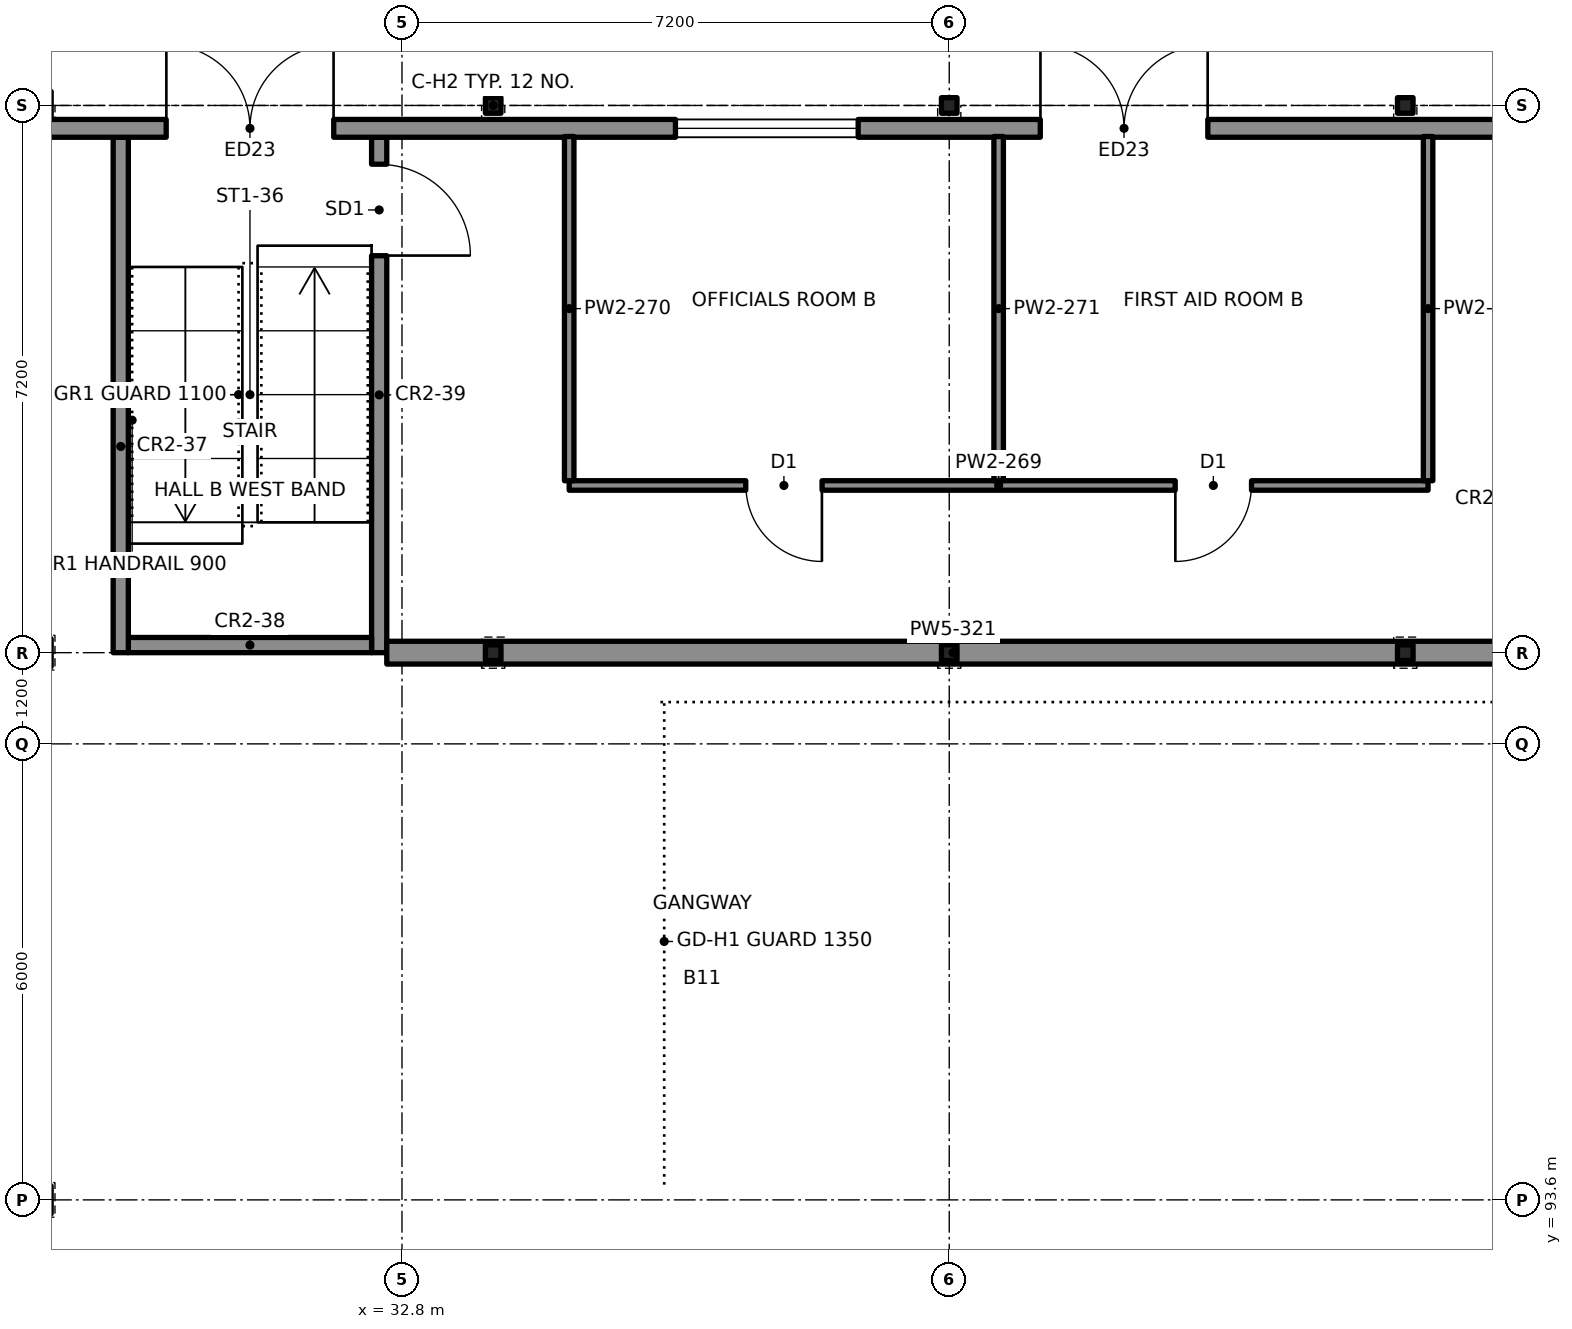
"""IFC4 building model, lengths in metres.
Left out: names, types, materials, properties, quantities, classifications, styles, units other than length and angle.
Written with IfcOpenShell. Run it as: python <this file> out.ifc"""

import sys

from ifc_helpers import new_model, si_unit, direction, frame, frame_2d, origin, origin_2d, place, context, subcontext, project, spatial, rectangle, i_section, extrude, element, fill, save


model = new_model("IFC4")
c1 = context("Model", 3, precision=1e-05, world=origin(), true_north=direction((0.0, 1.0)))
c2 = subcontext(c1, "Body", "Model", "MODEL_VIEW")
j1 = project(units=[si_unit("LENGTHUNIT", "METRE"), si_unit("PLANEANGLEUNIT", "RADIAN")], contexts=[c1])
p1 = place(None, origin())
s1 = spatial("IfcSite", under=j1, at=p1, CompositionType="ELEMENT")
p2 = place(p1, origin())
s2 = spatial("IfcBuilding", under=s1, at=p2, CompositionType="ELEMENT")
p3 = place(p2, origin())
s3 = spatial("IfcBuildingStorey", under=s2, at=p3, CompositionType="ELEMENT", Elevation=0.0)
for number, where, z_axis, x_axis in (
    (1, (34.0, 100.8, -0.5), (0.0, 0.0, 1.0), (1.0, 0.0, 0.0)),
    (2, (34.0, 108.0, -0.5), (0.0, 0.0, 1.0), (1.0, 0.0, 0.0)),
    (3, (40.0, 100.8, -0.5), (0.0, 0.0, 1.0), (1.0, 0.0, 0.0)),
    (4, (40.0, 108.0, -0.5), (0.0, 0.0, 1.0), (1.0, 0.0, 0.0)),
    (5, (46.0, 100.8, -0.5), (0.0, 0.0, 1.0), (1.0, 0.0, 0.0)),
    (6, (46.0, 108.0, -0.5), (0.0, 0.0, 1.0), (1.0, 0.0, 0.0)),
):
    element("IfcColumn", number, at=place(p3, frame(where, z_axis=z_axis, x_axis=x_axis)), inside=s3, PredefinedType="COLUMN", context=c2, shape_type="SweptSolid", body=[
        extrude(i_section(OverallWidth=0.205, OverallDepth=0.31, WebThickness=0.01, FlangeThickness=0.016, at=origin_2d()), origin(), (0.0, 0.0, 1.0), 4.9),
    ])
p4 = place(p3, frame((26.8, 107.699, 0.0), z_axis=(0.0, 0.0, 1.0), x_axis=(1.0, 0.0, 0.0)))
e7 = element("IfcWall", 7, at=p4, inside=s3, PredefinedType="SOLIDWALL", context=c2, shape_type="SweptSolid", body=[
    extrude(rectangle(XDim=50.4, YDim=0.234, at=frame_2d((25.2, 0.0))), origin(), (0.0, 0.0, 1.0), 4.4),
])
p5 = place(p4, frame((9.6, 0.0, 1.0)))
e8 = element("IfcOpeningElement", 8, at=p5, cuts=e7, PredefinedType="OPENING", context=c2, shape_type="SweptSolid", body=[
    extrude(rectangle(XDim=2.4, YDim=2.4, at=frame_2d((1.2, 1.2))), frame((0.0, 0.127, 0.0), z_axis=(0.0, -1.0, 0.0), x_axis=(1.0, 0.0, 0.0)), (0.0, 0.0, 1.0), 0.254),
])
p6 = place(p4, frame((21.6, 0.0, 1.0)))
e9 = element("IfcOpeningElement", 9, at=p6, cuts=e7, PredefinedType="OPENING", context=c2, shape_type="SweptSolid", body=[
    extrude(rectangle(XDim=2.4, YDim=2.4, at=frame_2d((1.2, 1.2))), frame((0.0, 0.127, 0.0), z_axis=(0.0, -1.0, 0.0), x_axis=(1.0, 0.0, 0.0)), (0.0, 0.0, 1.0), 0.254),
])
p7 = place(p4, frame((26.4, 0.0, 1.0)))
e10 = element("IfcOpeningElement", 10, at=p7, cuts=e7, PredefinedType="OPENING", context=c2, shape_type="SweptSolid", body=[
    extrude(rectangle(XDim=2.4, YDim=2.4, at=frame_2d((1.2, 1.2))), frame((0.0, 0.127, 0.0), z_axis=(0.0, -1.0, 0.0), x_axis=(1.0, 0.0, 0.0)), (0.0, 0.0, 1.0), 0.254),
])
p8 = place(p4, frame((38.4, 0.0, 1.0)))
e11 = element("IfcOpeningElement", 11, at=p8, cuts=e7, PredefinedType="OPENING", context=c2, shape_type="SweptSolid", body=[
    extrude(rectangle(XDim=2.4, YDim=2.4, at=frame_2d((1.2, 1.2))), frame((0.0, 0.127, 0.0), z_axis=(0.0, -1.0, 0.0), x_axis=(1.0, 0.0, 0.0)), (0.0, 0.0, 1.0), 0.254),
])
p9 = place(p4, frame((14.4, 0.0, 0.0)))
e12 = element("IfcOpeningElement", 12, at=p9, cuts=e7, PredefinedType="OPENING", context=c2, shape_type="SweptSolid", body=[
    extrude(rectangle(XDim=2.2, YDim=2.4, at=frame_2d((1.1, 1.2))), frame((0.0, 0.127, 0.0), z_axis=(0.0, -1.0, 0.0), x_axis=(1.0, 0.0, 0.0)), (0.0, 0.0, 1.0), 0.254),
])
p10 = place(p4, frame((33.8, 0.0, 0.0)))
e13 = element("IfcOpeningElement", 13, at=p10, cuts=e7, PredefinedType="OPENING", context=c2, shape_type="SweptSolid", body=[
    extrude(rectangle(XDim=2.2, YDim=2.4, at=frame_2d((1.1, 1.2))), frame((0.0, 0.127, 0.0), z_axis=(0.0, -1.0, 0.0), x_axis=(1.0, 0.0, 0.0)), (0.0, 0.0, 1.0), 0.254),
])
p11 = place(p4, frame((2.9, 0.0, 0.0)))
e14 = element("IfcOpeningElement", 14, at=p11, cuts=e7, PredefinedType="OPENING", context=c2, shape_type="SweptSolid", body=[
    extrude(rectangle(XDim=2.2, YDim=2.4, at=frame_2d((1.1, 1.2))), frame((0.0, 0.127, 0.0), z_axis=(0.0, -1.0, 0.0), x_axis=(1.0, 0.0, 0.0)), (0.0, 0.0, 1.0), 0.254),
])
p12 = place(p4, frame((44.9, 0.0, 0.0)))
e15 = element("IfcOpeningElement", 15, at=p12, cuts=e7, PredefinedType="OPENING", context=c2, shape_type="SweptSolid", body=[
    extrude(rectangle(XDim=2.2, YDim=2.4, at=frame_2d((1.1, 1.2))), frame((0.0, 0.127, 0.0), z_axis=(0.0, -1.0, 0.0), x_axis=(1.0, 0.0, 0.0)), (0.0, 0.0, 1.0), 0.254),
])
p13 = place(p3, frame((29.1, 100.8, 0.0), z_axis=(0.0, 0.0, 1.0), x_axis=(0.0, 1.0, 0.0)))
e16 = element("IfcWall", 16, at=p13, inside=s3, PredefinedType="SOLIDWALL", context=c2, shape_type="SweptSolid", body=[
    extrude(rectangle(XDim=6.783, YDim=0.2, at=frame_2d((3.392, 0.0))), origin(), (0.0, 0.0, 1.0), 4.4),
])
p14 = place(p3, frame((32.5, 100.8, 0.0), z_axis=(0.0, 0.0, 1.0), x_axis=(0.0, 1.0, 0.0)))
e17 = element("IfcWall", 17, at=p14, inside=s3, PredefinedType="SOLIDWALL", context=c2, shape_type="SweptSolid", body=[
    extrude(rectangle(XDim=6.783, YDim=0.2, at=frame_2d((3.392, 0.0))), origin(), (0.0, 0.0, 1.0), 4.4),
])
p15 = place(p14, frame((5.225, 0.0, 0.0)))
e18 = element("IfcOpeningElement", 18, at=p15, cuts=e17, PredefinedType="OPENING", context=c2, shape_type="SweptSolid", body=[
    extrude(rectangle(XDim=1.2, YDim=2.1, at=frame_2d((0.6, 1.05))), frame((0.0, 0.11, 0.0), z_axis=(0.0, -1.0, 0.0), x_axis=(1.0, 0.0, 0.0)), (0.0, 0.0, 1.0), 0.22),
])
p16 = place(p3, frame((29.2, 100.9, 0.0), z_axis=(0.0, 0.0, 1.0), x_axis=(1.0, 0.0, 0.0)))
e19 = element("IfcWall", 19, at=p16, inside=s3, PredefinedType="SOLIDWALL", context=c2, shape_type="SweptSolid", body=[
    extrude(rectangle(XDim=3.2, YDim=0.2, at=frame_2d((1.6, 0.0))), origin(), (0.0, 0.0, 1.0), 4.4),
])
p17 = place(p3, frame((32.6, 100.8, 0.0), z_axis=(0.0, 0.0, 1.0), x_axis=(1.0, 0.0, 0.0)))
e20 = element("IfcWall", 20, at=p17, inside=s3, PredefinedType="PARTITIONING", context=c2, shape_type="SweptSolid", body=[
    extrude(rectangle(XDim=14.9, YDim=0.3, at=frame_2d((7.45, 0.0))), origin(), (0.0, 0.0, 1.0), 3.8),
])
p18 = place(p3, frame((35.0, 103.0, 0.0), z_axis=(0.0, 0.0, 1.0), x_axis=(1.0, 0.0, 0.0)))
e21 = element("IfcWall", 21, at=p18, inside=s3, PredefinedType="PARTITIONING", context=c2, shape_type="SweptSolid", body=[
    extrude(rectangle(XDim=11.3, YDim=0.125, at=frame_2d((5.65, 0.0))), origin(), (0.0, 0.0, 1.0), 3.65),
])
p19 = place(p18, frame((2.325, 0.0, 0.0)))
e22 = element("IfcOpeningElement", 22, at=p19, cuts=e21, PredefinedType="OPENING", context=c2, shape_type="SweptSolid", body=[
    extrude(rectangle(XDim=1.0, YDim=2.1, at=frame_2d((0.5, 1.05))), frame((0.0, 0.073, 0.0), z_axis=(0.0, -1.0, 0.0), x_axis=(1.0, 0.0, 0.0)), (0.0, 0.0, 1.0), 0.145),
])
p20 = place(p18, frame((7.975, 0.0, 0.0)))
e23 = element("IfcOpeningElement", 23, at=p20, cuts=e21, PredefinedType="OPENING", context=c2, shape_type="SweptSolid", body=[
    extrude(rectangle(XDim=1.0, YDim=2.1, at=frame_2d((0.5, 1.05))), frame((0.0, 0.073, 0.0), z_axis=(0.0, -1.0, 0.0), x_axis=(1.0, 0.0, 0.0)), (0.0, 0.0, 1.0), 0.145),
])
for number, where, z_axis, x_axis in (
    (24, (35.0, 103.062, 0.0), (0.0, 0.0, 1.0), (0.0, 1.0, 0.0)),
    (25, (40.65, 103.062, 0.0), (0.0, 0.0, 1.0), (0.0, 1.0, 0.0)),
    (26, (46.3, 103.062, 0.0), (0.0, 0.0, 1.0), (0.0, 1.0, 0.0)),
):
    element("IfcWall", number, at=place(p3, frame(where, z_axis=z_axis, x_axis=x_axis)), inside=s3, PredefinedType="PARTITIONING", context=c2, shape_type="SweptSolid", body=[
        extrude(rectangle(XDim=4.529, YDim=0.125, at=frame_2d((2.265, 0.0))), origin(), (0.0, 0.0, 1.0), 3.65),
    ])
p21 = place(p5, origin())
e27 = element("IfcWindow", 27, at=p21, inside=s3, PartitioningType="SINGLE_PANEL", PredefinedType="WINDOW", context=c2, shape_type="SweptSolid", body=[
    extrude(rectangle(XDim=2.4, YDim=2.4, at=frame_2d((1.2, 1.2))), frame((0.0, 0.03, 0.0), z_axis=(0.0, -1.0, 0.0), x_axis=(1.0, 0.0, 0.0)), (0.0, 0.0, 1.0), 0.06),
])
fill(e8, e27)
p22 = place(p9, origin())
e28 = element("IfcDoor", 28, at=p22, inside=s3, OperationType="DOUBLE_DOOR_SINGLE_SWING", PredefinedType="DOOR", context=c2, shape_type="SweptSolid", body=[
    extrude(rectangle(XDim=2.2, YDim=2.4, at=frame_2d((1.1, 1.2))), frame((0.0, 0.025, 0.0), z_axis=(0.0, -1.0, 0.0), x_axis=(1.0, 0.0, 0.0)), (0.0, 0.0, 1.0), 0.05),
])
fill(e12, e28)
p23 = place(p11, origin())
e29 = element("IfcDoor", 29, at=p23, inside=s3, OperationType="DOUBLE_DOOR_SINGLE_SWING", PredefinedType="DOOR", context=c2, shape_type="SweptSolid", body=[
    extrude(rectangle(XDim=2.2, YDim=2.4, at=frame_2d((1.1, 1.2))), frame((0.0, 0.025, 0.0), z_axis=(0.0, -1.0, 0.0), x_axis=(1.0, 0.0, 0.0)), (0.0, 0.0, 1.0), 0.05),
])
fill(e14, e29)
p24 = place(p15, origin())
e30 = element("IfcDoor", 30, at=p24, inside=s3, OperationType="SINGLE_SWING_LEFT", PredefinedType="DOOR", context=c2, shape_type="SweptSolid", body=[
    extrude(rectangle(XDim=1.2, YDim=2.1, at=frame_2d((0.6, 1.05))), frame((0.0, 0.025, 0.0), z_axis=(0.0, -1.0, 0.0), x_axis=(1.0, 0.0, 0.0)), (0.0, 0.0, 1.0), 0.05),
])
fill(e18, e30)
p25 = place(p19, origin())
e31 = element("IfcDoor", 31, at=p25, inside=s3, OperationType="SINGLE_SWING_RIGHT", PredefinedType="DOOR", context=c2, shape_type="SweptSolid", body=[
    extrude(rectangle(XDim=1.0, YDim=2.1, at=frame_2d((0.5, 1.05))), frame((0.0, 0.025, 0.0), z_axis=(0.0, -1.0, 0.0), x_axis=(1.0, 0.0, 0.0)), (0.0, 0.0, 1.0), 0.05),
])
fill(e22, e31)
p26 = place(p20, origin())
e32 = element("IfcDoor", 32, at=p26, inside=s3, OperationType="SINGLE_SWING_LEFT", PredefinedType="DOOR", context=c2, shape_type="SweptSolid", body=[
    extrude(rectangle(XDim=1.0, YDim=2.1, at=frame_2d((0.5, 1.05))), frame((0.0, 0.025, 0.0), z_axis=(0.0, -1.0, 0.0), x_axis=(1.0, 0.0, 0.0)), (0.0, 0.0, 1.0), 0.05),
])
fill(e23, e32)
save(model, sys.argv[1])
